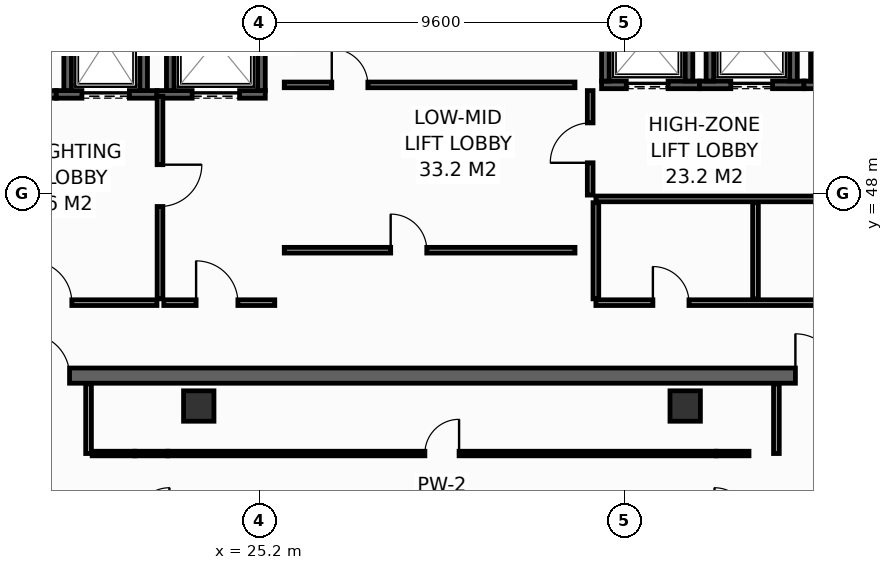
"""IFC4 building model, lengths in metres.
Left out: names, types, materials, properties, quantities, classifications, styles, units other than length and angle.
Written with IfcOpenShell. Run it as: python <this file> out.ifc"""

import sys

from ifc_helpers import new_model, si_unit, direction, frame, frame_2d, origin, origin_2d, place, context, subcontext, project, spatial, rectangle, hollow_rectangle, extrude, element, fill, save


model = new_model("IFC4")
c1 = context("Model", 3, precision=1e-05, world=origin(), true_north=direction((0.0, 1.0)))
c2 = subcontext(c1, "Body", "Model", "MODEL_VIEW")
j1 = project(units=[si_unit("LENGTHUNIT", "METRE"), si_unit("PLANEANGLEUNIT", "RADIAN")], contexts=[c1])
p1 = place(None, origin())
s1 = spatial("IfcSite", under=j1, at=p1, CompositionType="ELEMENT")
p2 = place(p1, origin())
s2 = spatial("IfcBuilding", under=s1, at=p2, CompositionType="ELEMENT")
p3 = place(p2, frame((0.0, 0.0, 249.6)))
s3 = spatial("IfcBuildingStorey", under=s2, at=p3, CompositionType="ELEMENT", Elevation=249.6)
p4 = place(p3, frame((13.7, 43.2, 0.0), z_axis=(0.0, 0.0, 1.0), x_axis=(1.0, 0.0, 0.0)))
e1 = element("IfcWall", 1, at=p4, inside=s3, PredefinedType="SHEAR", context=c2, shape_type="SweptSolid", body=[
    extrude(rectangle(XDim=32.5, YDim=0.4, at=frame_2d((16.25, 0.0))), origin(), (0.0, 0.0, 1.0), 3.35),
])
p5 = place(p4, frame((5.4, 0.0, 0.0)))
e2 = element("IfcOpeningElement", 2, at=p5, cuts=e1, PredefinedType="OPENING", context=c2, shape_type="SweptSolid", body=[
    extrude(rectangle(XDim=1.1, YDim=2.15, at=frame_2d((0.55, 1.075))), frame((0.0, 0.21, 0.0), z_axis=(0.0, -1.0, 0.0), x_axis=(1.0, 0.0, 0.0)), (0.0, 0.0, 1.0), 0.42),
])
p6 = place(p4, frame((25.6, 0.0, 0.0)))
e3 = element("IfcOpeningElement", 3, at=p6, cuts=e1, PredefinedType="OPENING", context=c2, shape_type="SweptSolid", body=[
    extrude(rectangle(XDim=1.1, YDim=2.15, at=frame_2d((0.55, 1.075))), frame((0.0, 0.21, 0.0), z_axis=(0.0, -1.0, 0.0), x_axis=(1.0, 0.0, 0.0)), (0.0, 0.0, 1.0), 0.42),
])
for number, where, z_axis, x_axis in (
    (4, (23.6, 42.4, 0.0), (0.0, 0.0, 1.0), (1.0, 0.0, 0.0)),
    (5, (36.4, 42.4, 0.0), (0.0, 0.0, 1.0), (1.0, 0.0, 0.0)),
):
    element("IfcColumn", number, at=place(p3, frame(where, z_axis=z_axis, x_axis=x_axis)), inside=s3, PredefinedType="COLUMN", context=c2, shape_type="SweptSolid", body=[
        extrude(hollow_rectangle(XDim=0.8, YDim=0.8, WallThickness=0.036, at=origin_2d()), origin(), (0.0, 0.0, 1.0), 3.8),
    ])
p7 = place(p3, frame((17.33, 50.6, 0.0), z_axis=(0.0, 0.0, 1.0), x_axis=(1.0, 0.0, 0.0)))
e6 = element("IfcWall", 6, at=p7, inside=s3, PredefinedType="SHEAR", context=c2, shape_type="SweptSolid", body=[
    extrude(rectangle(XDim=2.52, YDim=0.2, at=frame_2d((1.26, 0.0))), origin(), (0.0, 0.0, 1.0), 3.35),
])
p8 = place(p7, frame((0.595, 0.0, 0.0)))
e7 = element("IfcOpeningElement", 7, at=p8, cuts=e6, PredefinedType="OPENING", context=c2, shape_type="SweptSolid", body=[
    extrude(rectangle(XDim=1.25, YDim=2.3, at=frame_2d((0.625, 1.15))), frame((0.0, 0.11, 0.0), z_axis=(0.0, -1.0, 0.0), x_axis=(1.0, 0.0, 0.0)), (0.0, 0.0, 1.0), 0.22),
])
p9 = place(p3, frame((19.85, 50.6, 0.0), z_axis=(0.0, 0.0, 1.0), x_axis=(1.0, 0.0, 0.0)))
e8 = element("IfcWall", 8, at=p9, inside=s3, PredefinedType="SHEAR", context=c2, shape_type="SweptSolid", body=[
    extrude(rectangle(XDim=2.65, YDim=0.2, at=frame_2d((1.325, 0.0))), origin(), (0.0, 0.0, 1.0), 3.35),
])
p10 = place(p9, frame((0.675, 0.0, 0.0)))
e9 = element("IfcOpeningElement", 9, at=p10, cuts=e8, PredefinedType="OPENING", context=c2, shape_type="SweptSolid", body=[
    extrude(rectangle(XDim=1.25, YDim=2.3, at=frame_2d((0.625, 1.15))), frame((0.0, 0.11, 0.0), z_axis=(0.0, -1.0, 0.0), x_axis=(1.0, 0.0, 0.0)), (0.0, 0.0, 1.0), 0.22),
])
for number, where, z_axis, x_axis in (
    (10, (20.15, 50.7, 0.0), (0.0, 0.0, 1.0), (0.0, 1.0, 0.0)),
    (11, (22.15, 50.7, 0.0), (0.0, 0.0, 1.0), (0.0, 1.0, 0.0)),
):
    element("IfcWall", number, at=place(p3, frame(where, z_axis=z_axis, x_axis=x_axis)), inside=s3, PredefinedType="SHEAR", context=c2, shape_type="SweptSolid", body=[
        extrude(rectangle(XDim=2.6, YDim=0.2, at=frame_2d((1.3, 0.0))), origin(), (0.0, 0.0, 1.0), 3.35),
    ])
p11 = place(p3, frame((22.5, 50.6, 0.0), z_axis=(0.0, 0.0, 1.0), x_axis=(1.0, 0.0, 0.0)))
e12 = element("IfcWall", 12, at=p11, inside=s3, PredefinedType="SHEAR", context=c2, shape_type="SweptSolid", body=[
    extrude(rectangle(XDim=2.85, YDim=0.2, at=frame_2d((1.425, 0.0))), origin(), (0.0, 0.0, 1.0), 3.35),
])
p12 = place(p11, frame((0.925, 0.0, 0.0)))
e13 = element("IfcOpeningElement", 13, at=p12, cuts=e12, PredefinedType="OPENING", context=c2, shape_type="SweptSolid", body=[
    extrude(rectangle(XDim=1.25, YDim=2.3, at=frame_2d((0.625, 1.15))), frame((0.0, 0.11, 0.0), z_axis=(0.0, -1.0, 0.0), x_axis=(1.0, 0.0, 0.0)), (0.0, 0.0, 1.0), 0.22),
])
for number, where, z_axis, x_axis in (
    (14, (22.85, 50.7, 0.0), (0.0, 0.0, 1.0), (0.0, 1.0, 0.0)),
    (15, (25.25, 50.7, 0.0), (0.0, 0.0, 1.0), (0.0, 1.0, 0.0)),
):
    element("IfcWall", number, at=place(p3, frame(where, z_axis=z_axis, x_axis=x_axis)), inside=s3, PredefinedType="SHEAR", context=c2, shape_type="SweptSolid", body=[
        extrude(rectangle(XDim=2.6, YDim=0.2, at=frame_2d((1.3, 0.0))), origin(), (0.0, 0.0, 1.0), 3.35),
    ])
p13 = place(p3, frame((34.2, 50.85, 0.0), z_axis=(0.0, 0.0, 1.0), x_axis=(1.0, 0.0, 0.0)))
e16 = element("IfcWall", 16, at=p13, inside=s3, PredefinedType="SHEAR", context=c2, shape_type="SweptSolid", body=[
    extrude(rectangle(XDim=2.575, YDim=0.2, at=frame_2d((1.288, 0.0))), origin(), (0.0, 0.0, 1.0), 3.35),
])
p14 = place(p13, frame((0.65, 0.0, 0.0)))
e17 = element("IfcOpeningElement", 17, at=p14, cuts=e16, PredefinedType="OPENING", context=c2, shape_type="SweptSolid", body=[
    extrude(rectangle(XDim=1.1, YDim=2.2, at=frame_2d((0.55, 1.1))), frame((0.0, 0.11, 0.0), z_axis=(0.0, -1.0, 0.0), x_axis=(1.0, 0.0, 0.0)), (0.0, 0.0, 1.0), 0.22),
])
for number, where, z_axis, x_axis in (
    (18, (34.3, 50.95, 0.0), (0.0, 0.0, 1.0), (0.0, 1.0, 0.0)),
    (19, (36.5, 50.95, 0.0), (0.0, 0.0, 1.0), (0.0, 1.0, 0.0)),
):
    element("IfcWall", number, at=place(p3, frame(where, z_axis=z_axis, x_axis=x_axis)), inside=s3, PredefinedType="SHEAR", context=c2, shape_type="SweptSolid", body=[
        extrude(rectangle(XDim=2.3, YDim=0.2, at=frame_2d((1.15, 0.0))), origin(), (0.0, 0.0, 1.0), 3.35),
    ])
p15 = place(p3, frame((36.775, 50.85, 0.0), z_axis=(0.0, 0.0, 1.0), x_axis=(1.0, 0.0, 0.0)))
e20 = element("IfcWall", 20, at=p15, inside=s3, PredefinedType="SHEAR", context=c2, shape_type="SweptSolid", body=[
    extrude(rectangle(XDim=2.75, YDim=0.2, at=frame_2d((1.375, 0.0))), origin(), (0.0, 0.0, 1.0), 3.35),
])
p16 = place(p15, frame((0.825, 0.0, 0.0)))
e21 = element("IfcOpeningElement", 21, at=p16, cuts=e20, PredefinedType="OPENING", context=c2, shape_type="SweptSolid", body=[
    extrude(rectangle(XDim=1.1, YDim=2.2, at=frame_2d((0.55, 1.1))), frame((0.0, 0.11, 0.0), z_axis=(0.0, -1.0, 0.0), x_axis=(1.0, 0.0, 0.0)), (0.0, 0.0, 1.0), 0.22),
])
for number, where, z_axis, x_axis in (
    (22, (37.05, 50.95, 0.0), (0.0, 0.0, 1.0), (0.0, 1.0, 0.0)),
    (23, (39.25, 50.95, 0.0), (0.0, 0.0, 1.0), (0.0, 1.0, 0.0)),
):
    element("IfcWall", number, at=place(p3, frame(where, z_axis=z_axis, x_axis=x_axis)), inside=s3, PredefinedType="SHEAR", context=c2, shape_type="SweptSolid", body=[
        extrude(rectangle(XDim=2.3, YDim=0.2, at=frame_2d((1.15, 0.0))), origin(), (0.0, 0.0, 1.0), 3.35),
    ])
p17 = place(p3, frame((39.525, 50.85, 0.0), z_axis=(0.0, 0.0, 1.0), x_axis=(1.0, 0.0, 0.0)))
e24 = element("IfcWall", 24, at=p17, inside=s3, PredefinedType="SHEAR", context=c2, shape_type="SweptSolid", body=[
    extrude(rectangle(XDim=3.045, YDim=0.2, at=frame_2d((1.522, 0.0))), origin(), (0.0, 0.0, 1.0), 3.35),
])
p18 = place(p17, frame((0.825, 0.0, 0.0)))
e25 = element("IfcOpeningElement", 25, at=p18, cuts=e24, PredefinedType="OPENING", context=c2, shape_type="SweptSolid", body=[
    extrude(rectangle(XDim=1.1, YDim=2.2, at=frame_2d((0.55, 1.1))), frame((0.0, 0.11, 0.0), z_axis=(0.0, -1.0, 0.0), x_axis=(1.0, 0.0, 0.0)), (0.0, 0.0, 1.0), 0.22),
])
p19 = place(p3, frame((39.8, 50.95, 0.0), z_axis=(0.0, 0.0, 1.0), x_axis=(0.0, 1.0, 0.0)))
e26 = element("IfcWall", 26, at=p19, inside=s3, PredefinedType="SHEAR", context=c2, shape_type="SweptSolid", body=[
    extrude(rectangle(XDim=2.3, YDim=0.2, at=frame_2d((1.15, 0.0))), origin(), (0.0, 0.0, 1.0), 3.35),
])
p20 = place(p3, frame((17.36, 45.12, 0.0), z_axis=(0.0, 0.0, 1.0), x_axis=(1.0, 0.0, 0.0)))
e27 = element("IfcWall", 27, at=p20, inside=s3, PredefinedType="PARTITIONING", context=c2, shape_type="SweptSolid", body=[
    extrude(rectangle(XDim=5.14, YDim=0.15, at=frame_2d((2.57, 0.0))), origin(), (0.0, 0.0, 1.0), 3.35),
])
p21 = place(p20, frame((1.8, 0.0, 0.0)))
e28 = element("IfcOpeningElement", 28, at=p21, cuts=e27, PredefinedType="OPENING", context=c2, shape_type="SweptSolid", body=[
    extrude(rectangle(XDim=1.1, YDim=2.15, at=frame_2d((0.55, 1.075))), frame((0.0, 0.085, 0.0), z_axis=(0.0, -1.0, 0.0), x_axis=(1.0, 0.0, 0.0)), (0.0, 0.0, 1.0), 0.17),
])
p22 = place(p3, frame((22.58, 50.55, 0.0), z_axis=(0.0, 0.0, 1.0), x_axis=(0.0, -1.0, 0.0)))
e29 = element("IfcWall", 29, at=p22, inside=s3, PredefinedType="PARTITIONING", context=c2, shape_type="SweptSolid", body=[
    extrude(rectangle(XDim=5.33, YDim=0.15, at=frame_2d((2.665, 0.0))), origin(), (0.0, 0.0, 1.0), 3.35),
])
p23 = place(p22, frame((1.8, 0.0, 0.0)))
e30 = element("IfcOpeningElement", 30, at=p23, cuts=e29, PredefinedType="OPENING", context=c2, shape_type="SweptSolid", body=[
    extrude(rectangle(XDim=1.1, YDim=2.15, at=frame_2d((0.55, 1.075))), frame((0.0, 0.085, 0.0), z_axis=(0.0, -1.0, 0.0), x_axis=(1.0, 0.0, 0.0)), (0.0, 0.0, 1.0), 0.17),
])
p24 = place(p3, frame((22.68, 45.12, 0.0), z_axis=(0.0, 0.0, 1.0), x_axis=(1.0, 0.0, 0.0)))
e31 = element("IfcWall", 31, at=p24, inside=s3, PredefinedType="PARTITIONING", context=c2, shape_type="SweptSolid", body=[
    extrude(rectangle(XDim=2.92, YDim=0.15, at=frame_2d((1.46, 0.0))), origin(), (0.0, 0.0, 1.0), 3.35),
])
p25 = place(p24, frame((0.85, 0.0, 0.0)))
e32 = element("IfcOpeningElement", 32, at=p25, cuts=e31, PredefinedType="OPENING", context=c2, shape_type="SweptSolid", body=[
    extrude(rectangle(XDim=1.1, YDim=2.15, at=frame_2d((0.55, 1.075))), frame((0.0, 0.085, 0.0), z_axis=(0.0, -1.0, 0.0), x_axis=(1.0, 0.0, 0.0)), (0.0, 0.0, 1.0), 0.17),
])
p26 = place(p3, frame((33.9, 47.95, 0.0), z_axis=(0.0, 0.0, 1.0), x_axis=(0.0, 1.0, 0.0)))
e33 = element("IfcWall", 33, at=p26, inside=s3, PredefinedType="PARTITIONING", context=c2, shape_type="SweptSolid", body=[
    extrude(rectangle(XDim=2.75, YDim=0.15, at=frame_2d((1.375, 0.0))), origin(), (0.0, 0.0, 1.0), 3.35),
])
p27 = place(p26, frame((0.85, 0.0, 0.0)))
e34 = element("IfcOpeningElement", 34, at=p27, cuts=e33, PredefinedType="OPENING", context=c2, shape_type="SweptSolid", body=[
    extrude(rectangle(XDim=1.05, YDim=2.15, at=frame_2d((0.525, 1.075))), frame((0.0, 0.085, 0.0), z_axis=(0.0, -1.0, 0.0), x_axis=(1.0, 0.0, 0.0)), (0.0, 0.0, 1.0), 0.17),
])
p28 = place(p3, frame((34.05, 45.12, 0.0), z_axis=(0.0, 0.0, 1.0), x_axis=(1.0, 0.0, 0.0)))
e35 = element("IfcWall", 35, at=p28, inside=s3, PredefinedType="PARTITIONING", context=c2, shape_type="SweptSolid", body=[
    extrude(rectangle(XDim=8.45, YDim=0.15, at=frame_2d((4.225, 0.0))), origin(), (0.0, 0.0, 1.0), 3.35),
])
p29 = place(p28, frame((1.5, 0.0, 0.0)))
e36 = element("IfcOpeningElement", 36, at=p29, cuts=e35, PredefinedType="OPENING", context=c2, shape_type="SweptSolid", body=[
    extrude(rectangle(XDim=0.95, YDim=2.15, at=frame_2d((0.475, 1.075))), frame((0.0, 0.085, 0.0), z_axis=(0.0, -1.0, 0.0), x_axis=(1.0, 0.0, 0.0)), (0.0, 0.0, 1.0), 0.17),
])
p30 = place(p28, frame((5.8, 0.0, 0.0)))
e37 = element("IfcOpeningElement", 37, at=p30, cuts=e35, PredefinedType="OPENING", context=c2, shape_type="SweptSolid", body=[
    extrude(rectangle(XDim=0.95, YDim=2.15, at=frame_2d((0.475, 1.075))), frame((0.0, 0.085, 0.0), z_axis=(0.0, -1.0, 0.0), x_axis=(1.0, 0.0, 0.0)), (0.0, 0.0, 1.0), 0.17),
])
p31 = place(p3, frame((34.05, 47.85, 0.0), z_axis=(0.0, 0.0, 1.0), x_axis=(1.0, 0.0, 0.0)))
e38 = element("IfcWall", 38, at=p31, inside=s3, PredefinedType="PARTITIONING", context=c2, shape_type="SweptSolid", body=[
    extrude(rectangle(XDim=8.45, YDim=0.15, at=frame_2d((4.225, 0.0))), origin(), (0.0, 0.0, 1.0), 3.35),
])
for number, where, z_axis, x_axis in (
    (39, (38.25, 45.22, 0.0), (0.0, 0.0, 1.0), (0.0, 1.0, 0.0)),
    (40, (34.05, 45.22, 0.0), (0.0, 0.0, 1.0), (0.0, 1.0, 0.0)),
):
    element("IfcWall", number, at=place(p3, frame(where, z_axis=z_axis, x_axis=x_axis)), inside=s3, PredefinedType="PARTITIONING", context=c2, shape_type="SweptSolid", body=[
        extrude(rectangle(XDim=2.53, YDim=0.15, at=frame_2d((1.265, 0.0))), origin(), (0.0, 0.0, 1.0), 3.35),
    ])
p32 = place(p3, frame((25.85, 50.85, 0.0), z_axis=(0.0, 0.0, 1.0), x_axis=(1.0, 0.0, 0.0)))
e41 = element("IfcWall", 41, at=p32, inside=s3, PredefinedType="PARTITIONING", context=c2, shape_type="SweptSolid", body=[
    extrude(rectangle(XDim=7.65, YDim=0.15, at=frame_2d((3.825, 0.0))), origin(), (0.0, 0.0, 1.0), 3.35),
])
p33 = place(p32, frame((1.25, 0.0, 0.0)))
e42 = element("IfcOpeningElement", 42, at=p33, cuts=e41, PredefinedType="OPENING", context=c2, shape_type="SweptSolid", body=[
    extrude(rectangle(XDim=0.95, YDim=2.15, at=frame_2d((0.475, 1.075))), frame((0.0, 0.085, 0.0), z_axis=(0.0, -1.0, 0.0), x_axis=(1.0, 0.0, 0.0)), (0.0, 0.0, 1.0), 0.17),
])
p34 = place(p3, frame((25.85, 46.5, 0.0), z_axis=(0.0, 0.0, 1.0), x_axis=(1.0, 0.0, 0.0)))
e43 = element("IfcWall", 43, at=p34, inside=s3, PredefinedType="PARTITIONING", context=c2, shape_type="SweptSolid", body=[
    extrude(rectangle(XDim=7.65, YDim=0.15, at=frame_2d((3.825, 0.0))), origin(), (0.0, 0.0, 1.0), 3.35),
])
p35 = place(p34, frame((2.8, 0.0, 0.0)))
e44 = element("IfcOpeningElement", 44, at=p35, cuts=e43, PredefinedType="OPENING", context=c2, shape_type="SweptSolid", body=[
    extrude(rectangle(XDim=0.95, YDim=2.15, at=frame_2d((0.475, 1.075))), frame((0.0, 0.085, 0.0), z_axis=(0.0, -1.0, 0.0), x_axis=(1.0, 0.0, 0.0)), (0.0, 0.0, 1.0), 0.17),
])
for number, where, z_axis, x_axis in (
    (45, (20.7, 41.15, 0.0), (0.0, 0.0, 1.0), (0.0, 1.0, 0.0)),
    (46, (38.8, 41.15, 0.0), (0.0, 0.0, 1.0), (0.0, 1.0, 0.0)),
):
    element("IfcWall", number, at=place(p3, frame(where, z_axis=z_axis, x_axis=x_axis)), inside=s3, PredefinedType="PARTITIONING", context=c2, shape_type="SweptSolid", body=[
        extrude(rectangle(XDim=1.83, YDim=0.15, at=frame_2d((0.915, 0.0))), origin(), (0.0, 0.0, 1.0), 3.35),
    ])
p36 = place(p3, frame((22.783, 41.15, 0.0), z_axis=(0.0, 0.0, 1.0), x_axis=(1.0, 0.0, 0.0)))
e47 = element("IfcWall", 47, at=p36, inside=s3, PredefinedType="PARTITIONING", context=c2, shape_type="SweptSolid", body=[
    extrude(rectangle(XDim=14.434, YDim=0.12, at=frame_2d((7.217, 0.0))), origin(), (0.0, 0.0, 1.0), 3.35),
])
p37 = place(p36, frame((6.767, 0.0, 0.0)))
e48 = element("IfcOpeningElement", 48, at=p37, cuts=e47, PredefinedType="OPENING", context=c2, shape_type="SweptSolid", body=[
    extrude(rectangle(XDim=0.9, YDim=2.1, at=frame_2d((0.45, 1.05))), frame((0.0, 0.07, 0.0), z_axis=(0.0, -1.0, 0.0), x_axis=(1.0, 0.0, 0.0)), (0.0, 0.0, 1.0), 0.14),
])
p38 = place(p3, frame((20.795, 41.15, 0.0), z_axis=(0.0, 0.0, 1.0), x_axis=(1.0, 0.0, 0.0)))
e49 = element("IfcWall", 49, at=p38, inside=s3, PredefinedType="PARTITIONING", context=c2, shape_type="SweptSolid", body=[
    extrude(rectangle(XDim=1.126, YDim=0.12, at=frame_2d((0.563, 0.0))), origin(), (0.0, 0.0, 1.0), 3.35),
])
for number, where, z_axis, x_axis in (
    (50, (21.921, 41.15, 0.0), (0.0, 0.0, 1.0), (1.0, 0.0, 0.0)),
    (51, (37.217, 41.15, 0.0), (0.0, 0.0, 1.0), (1.0, 0.0, 0.0)),
):
    element("IfcWall", number, at=place(p3, frame(where, z_axis=z_axis, x_axis=x_axis)), inside=s3, PredefinedType="PARTITIONING", context=c2, shape_type="SweptSolid", body=[
        extrude(rectangle(XDim=0.862, YDim=0.12, at=frame_2d((0.431, 0.0))), origin(), (0.0, 0.0, 1.0), 1.935),
    ])
p39 = place(p10, origin())
e52 = element("IfcDoor", 52, at=p39, inside=s3, OperationType="SLIDING_TO_LEFT", PredefinedType="DOOR", context=c2, shape_type="SweptSolid", body=[
    extrude(rectangle(XDim=1.25, YDim=2.3, at=frame_2d((0.625, 1.15))), frame((0.0, 0.025, 0.0), z_axis=(0.0, -1.0, 0.0), x_axis=(1.0, 0.0, 0.0)), (0.0, 0.0, 1.0), 0.05),
])
fill(e9, e52)
p40 = place(p12, origin())
e53 = element("IfcDoor", 53, at=p40, inside=s3, OperationType="SLIDING_TO_LEFT", PredefinedType="DOOR", context=c2, shape_type="SweptSolid", body=[
    extrude(rectangle(XDim=1.25, YDim=2.3, at=frame_2d((0.625, 1.15))), frame((0.0, 0.025, 0.0), z_axis=(0.0, -1.0, 0.0), x_axis=(1.0, 0.0, 0.0)), (0.0, 0.0, 1.0), 0.05),
])
fill(e13, e53)
p41 = place(p14, origin())
e54 = element("IfcDoor", 54, at=p41, inside=s3, OperationType="SLIDING_TO_LEFT", PredefinedType="DOOR", context=c2, shape_type="SweptSolid", body=[
    extrude(rectangle(XDim=1.1, YDim=2.2, at=frame_2d((0.55, 1.1))), frame((0.0, 0.025, 0.0), z_axis=(0.0, -1.0, 0.0), x_axis=(1.0, 0.0, 0.0)), (0.0, 0.0, 1.0), 0.05),
])
fill(e17, e54)
p42 = place(p16, origin())
e55 = element("IfcDoor", 55, at=p42, inside=s3, OperationType="SLIDING_TO_LEFT", PredefinedType="DOOR", context=c2, shape_type="SweptSolid", body=[
    extrude(rectangle(XDim=1.1, YDim=2.2, at=frame_2d((0.55, 1.1))), frame((0.0, 0.025, 0.0), z_axis=(0.0, -1.0, 0.0), x_axis=(1.0, 0.0, 0.0)), (0.0, 0.0, 1.0), 0.05),
])
fill(e21, e55)
p43 = place(p21, origin())
e56 = element("IfcDoor", 56, at=p43, inside=s3, OperationType="SINGLE_SWING_LEFT", PredefinedType="DOOR", context=c2, shape_type="SweptSolid", body=[
    extrude(rectangle(XDim=1.1, YDim=2.15, at=frame_2d((0.55, 1.075))), frame((0.0, 0.025, 0.0), z_axis=(0.0, -1.0, 0.0), x_axis=(1.0, 0.0, 0.0)), (0.0, 0.0, 1.0), 0.05),
])
fill(e28, e56)
p44 = place(p23, origin())
e57 = element("IfcDoor", 57, at=p44, inside=s3, OperationType="SINGLE_SWING_LEFT", PredefinedType="DOOR", context=c2, shape_type="SweptSolid", body=[
    extrude(rectangle(XDim=1.1, YDim=2.15, at=frame_2d((0.55, 1.075))), frame((0.0, 0.025, 0.0), z_axis=(0.0, -1.0, 0.0), x_axis=(1.0, 0.0, 0.0)), (0.0, 0.0, 1.0), 0.05),
])
fill(e30, e57)
p45 = place(p25, origin())
e58 = element("IfcDoor", 58, at=p45, inside=s3, OperationType="SINGLE_SWING_LEFT", PredefinedType="DOOR", context=c2, shape_type="SweptSolid", body=[
    extrude(rectangle(XDim=1.1, YDim=2.15, at=frame_2d((0.55, 1.075))), frame((0.0, 0.025, 0.0), z_axis=(0.0, -1.0, 0.0), x_axis=(1.0, 0.0, 0.0)), (0.0, 0.0, 1.0), 0.05),
])
fill(e32, e58)
p46 = place(p5, origin())
e59 = element("IfcDoor", 59, at=p46, inside=s3, OperationType="SINGLE_SWING_LEFT", PredefinedType="DOOR", context=c2, shape_type="SweptSolid", body=[
    extrude(rectangle(XDim=1.1, YDim=2.15, at=frame_2d((0.55, 1.075))), frame((0.0, 0.025, 0.0), z_axis=(0.0, -1.0, 0.0), x_axis=(1.0, 0.0, 0.0)), (0.0, 0.0, 1.0), 0.05),
])
fill(e2, e59)
p47 = place(p6, origin())
e60 = element("IfcDoor", 60, at=p47, inside=s3, OperationType="SINGLE_SWING_LEFT", PredefinedType="DOOR", context=c2, shape_type="SweptSolid", body=[
    extrude(rectangle(XDim=1.1, YDim=2.15, at=frame_2d((0.55, 1.075))), frame((0.0, 0.025, 0.0), z_axis=(0.0, -1.0, 0.0), x_axis=(1.0, 0.0, 0.0)), (0.0, 0.0, 1.0), 0.05),
])
fill(e3, e60)
p48 = place(p27, origin())
e61 = element("IfcDoor", 61, at=p48, inside=s3, OperationType="SINGLE_SWING_LEFT", PredefinedType="DOOR", context=c2, shape_type="SweptSolid", body=[
    extrude(rectangle(XDim=1.05, YDim=2.15, at=frame_2d((0.525, 1.075))), frame((0.0, 0.025, 0.0), z_axis=(0.0, -1.0, 0.0), x_axis=(1.0, 0.0, 0.0)), (0.0, 0.0, 1.0), 0.05),
])
fill(e34, e61)
p49 = place(p29, origin())
e62 = element("IfcDoor", 62, at=p49, inside=s3, OperationType="SINGLE_SWING_LEFT", PredefinedType="DOOR", context=c2, shape_type="SweptSolid", body=[
    extrude(rectangle(XDim=0.95, YDim=2.15, at=frame_2d((0.475, 1.075))), frame((0.0, 0.025, 0.0), z_axis=(0.0, -1.0, 0.0), x_axis=(1.0, 0.0, 0.0)), (0.0, 0.0, 1.0), 0.05),
])
fill(e36, e62)
p50 = place(p33, origin())
e63 = element("IfcDoor", 63, at=p50, inside=s3, OperationType="SINGLE_SWING_LEFT", PredefinedType="DOOR", context=c2, shape_type="SweptSolid", body=[
    extrude(rectangle(XDim=0.95, YDim=2.15, at=frame_2d((0.475, 1.075))), frame((0.0, 0.025, 0.0), z_axis=(0.0, -1.0, 0.0), x_axis=(1.0, 0.0, 0.0)), (0.0, 0.0, 1.0), 0.05),
])
fill(e42, e63)
p51 = place(p35, origin())
e64 = element("IfcDoor", 64, at=p51, inside=s3, OperationType="SINGLE_SWING_LEFT", PredefinedType="DOOR", context=c2, shape_type="SweptSolid", body=[
    extrude(rectangle(XDim=0.95, YDim=2.15, at=frame_2d((0.475, 1.075))), frame((0.0, 0.025, 0.0), z_axis=(0.0, -1.0, 0.0), x_axis=(1.0, 0.0, 0.0)), (0.0, 0.0, 1.0), 0.05),
])
fill(e44, e64)
p52 = place(p37, origin())
e65 = element("IfcDoor", 65, at=p52, inside=s3, OperationType="SINGLE_SWING_RIGHT", PredefinedType="DOOR", context=c2, shape_type="SweptSolid", body=[
    extrude(rectangle(XDim=0.9, YDim=2.1, at=frame_2d((0.45, 1.05))), frame((0.0, 0.025, 0.0), z_axis=(0.0, -1.0, 0.0), x_axis=(1.0, 0.0, 0.0)), (0.0, 0.0, 1.0), 0.05),
])
fill(e48, e65)
save(model, sys.argv[1])
